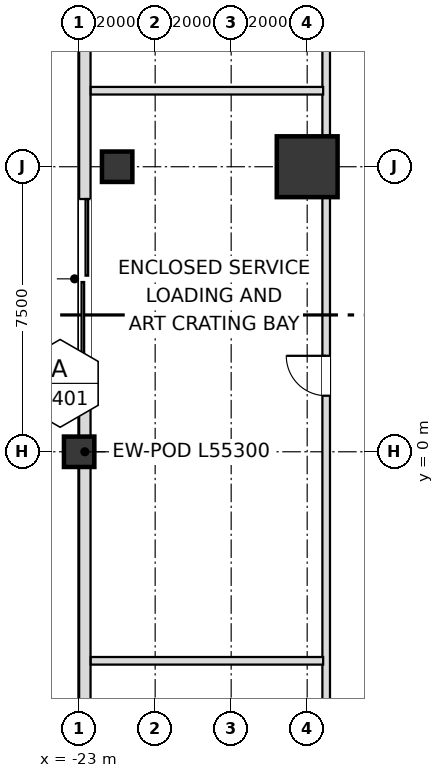
"""IFC4 building model, lengths in metres.
Left out: names, types, materials, properties, quantities, classifications, styles, units other than length and angle.
Written with IfcOpenShell. Run it as: python <this file> out.ifc"""

import sys

from ifc_helpers import new_model, si_unit, direction, frame, frame_2d, origin, origin_2d, place, context, subcontext, project, spatial, rectangle, extrude, element, fill, save


model = new_model("IFC4")
c1 = context("Model", 3, precision=1e-05, world=origin(), true_north=direction((0.0, 1.0)))
c2 = subcontext(c1, "Body", "Model", "MODEL_VIEW")
j1 = project(units=[si_unit("LENGTHUNIT", "METRE"), si_unit("PLANEANGLEUNIT", "RADIAN")], contexts=[c1])
p1 = place(None, origin())
s1 = spatial("IfcSite", under=j1, at=p1, CompositionType="ELEMENT")
p2 = place(p1, origin())
s2 = spatial("IfcBuilding", under=s1, at=p2, CompositionType="ELEMENT")
p3 = place(p2, origin())
s3 = spatial("IfcBuildingStorey", under=s2, at=p3, CompositionType="ELEMENT", Elevation=0.0)
p4 = place(p3, frame((-17.0, 7.5, 0.0), z_axis=(0.0, 0.0, 1.0), x_axis=(1.0, 0.0, 0.0)))
e1 = element("IfcColumn", 1, at=p4, inside=s3, PredefinedType="USERDEFINED", context=c2, shape_type="SweptSolid", body=[
    extrude(rectangle(XDim=1.6, YDim=1.6, at=origin_2d()), origin(), (0.0, 0.0, 1.0), 6.0),
])
for number, where, z_axis, x_axis in (
    (2, (-23.0, 0.0, 0.0), (0.0, 0.0, 1.0), (1.0, 0.0, 0.0)),
    (3, (-22.0, 7.5, 0.0), (0.0, 0.0, 1.0), (1.0, 0.0, 0.0)),
):
    element("IfcColumn", number, at=place(p3, frame(where, z_axis=z_axis, x_axis=x_axis)), inside=s3, PredefinedType="COLUMN", context=c2, shape_type="SweptSolid", body=[
        extrude(rectangle(XDim=0.8, YDim=0.8, at=origin_2d()), origin(), (0.0, 0.0, 1.0), 6.0),
    ])
p5 = place(p3, frame((-22.85, 27.65, 0.0), z_axis=(0.0, 0.0, 1.0), x_axis=(0.0, -1.0, 0.0)))
e4 = element("IfcWall", 4, at=p5, inside=s3, PredefinedType="SOLIDWALL", context=c2, shape_type="SweptSolid", body=[
    extrude(rectangle(XDim=55.3, YDim=0.3, at=frame_2d((27.65, 0.0))), origin(), (0.0, 0.0, 1.0), 5.076),
])
p6 = place(p5, frame((21.0, 0.0, 0.0)))
e5 = element("IfcOpeningElement", 5, at=p6, cuts=e4, PredefinedType="OPENING", context=c2, shape_type="SweptSolid", body=[
    extrude(rectangle(XDim=4.2, YDim=3.4, at=frame_2d((2.1, 1.7))), frame((0.0, 0.16, 0.0), z_axis=(0.0, -1.0, 0.0), x_axis=(1.0, 0.0, 0.0)), (0.0, 0.0, 1.0), 0.32),
])
p7 = place(p3, frame((-16.5, -19.5, 0.0), z_axis=(0.0, 0.0, 1.0), x_axis=(0.0, 1.0, 0.0)))
e6 = element("IfcWall", 6, at=p7, inside=s3, PredefinedType="SOLIDWALL", context=c2, shape_type="SweptSolid", body=[
    extrude(rectangle(XDim=39.0, YDim=0.2, at=frame_2d((19.5, 0.0))), origin(), (0.0, 0.0, 1.0), 5.01),
])
p8 = place(p7, frame((20.975, 0.0, 0.0)))
e7 = element("IfcOpeningElement", 7, at=p8, cuts=e6, PredefinedType="OPENING", context=c2, shape_type="SweptSolid", body=[
    extrude(rectangle(XDim=1.05, YDim=2.15, at=frame_2d((0.525, 1.075))), frame((0.0, 0.11, 0.0), z_axis=(0.0, -1.0, 0.0), x_axis=(1.0, 0.0, 0.0)), (0.0, 0.0, 1.0), 0.22),
])
p9 = place(p7, frame((8.025, 0.0, 0.0)))
e8 = element("IfcOpeningElement", 8, at=p9, cuts=e6, PredefinedType="OPENING", context=c2, shape_type="SweptSolid", body=[
    extrude(rectangle(XDim=0.95, YDim=2.15, at=frame_2d((0.475, 1.075))), frame((0.0, 0.11, 0.0), z_axis=(0.0, -1.0, 0.0), x_axis=(1.0, 0.0, 0.0)), (0.0, 0.0, 1.0), 0.22),
])
p10 = place(p7, frame((33.475, 0.0, 0.0)))
e9 = element("IfcOpeningElement", 9, at=p10, cuts=e6, PredefinedType="OPENING", context=c2, shape_type="SweptSolid", body=[
    extrude(rectangle(XDim=1.05, YDim=2.15, at=frame_2d((0.525, 1.075))), frame((0.0, 0.11, 0.0), z_axis=(0.0, -1.0, 0.0), x_axis=(1.0, 0.0, 0.0)), (0.0, 0.0, 1.0), 0.22),
])
for number, where, z_axis, x_axis in (
    (10, (-22.695, -5.5, 0.0), (0.0, 0.0, 1.0), (1.0, 0.0, 0.0)),
    (11, (-22.695, 9.5, 0.0), (0.0, 0.0, 1.0), (1.0, 0.0, 0.0)),
):
    element("IfcWall", number, at=place(p3, frame(where, z_axis=z_axis, x_axis=x_axis)), inside=s3, PredefinedType="SOLIDWALL", context=c2, shape_type="SweptSolid", body=[
        extrude(rectangle(XDim=6.115, YDim=0.2, at=frame_2d((3.058, 0.0))), origin(), (0.0, 0.0, 1.0), 5.01),
    ])
p11 = place(p6, origin())
e12 = element("IfcDoor", 12, at=p11, inside=s3, OperationType="ROLLINGUP", PredefinedType="GATE", context=c2, shape_type="SweptSolid", body=[
    extrude(rectangle(XDim=4.2, YDim=3.4, at=frame_2d((2.1, 1.7))), frame((0.0, 0.025, 0.0), z_axis=(0.0, -1.0, 0.0), x_axis=(1.0, 0.0, 0.0)), (0.0, 0.0, 1.0), 0.05),
])
fill(e5, e12)
p12 = place(p8, origin())
e13 = element("IfcDoor", 13, at=p12, inside=s3, OperationType="SINGLE_SWING_RIGHT", PredefinedType="DOOR", context=c2, shape_type="SweptSolid", body=[
    extrude(rectangle(XDim=1.05, YDim=2.15, at=frame_2d((0.525, 1.075))), frame((0.0, 0.025, 0.0), z_axis=(0.0, -1.0, 0.0), x_axis=(1.0, 0.0, 0.0)), (0.0, 0.0, 1.0), 0.05),
])
fill(e7, e13)
save(model, sys.argv[1])
